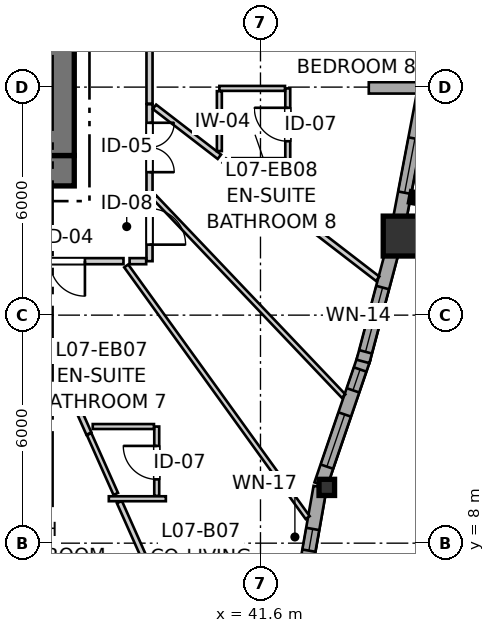
"""IFC4 building model, lengths in metres.
Left out: names, types, materials, properties, quantities, classifications, styles, units other than length and angle.
Written with IfcOpenShell. Run it as: python <this file> out.ifc"""

import sys

from ifc_helpers import new_model, si_unit, direction, frame, frame_2d, origin, origin_2d, place, context, subcontext, project, spatial, rectangle, i_section, extrude, source, transform, mapped, element, fill, save


model = new_model("IFC4")
c1 = context("Model", 3, precision=1e-05, world=origin(), true_north=direction((0.0, 1.0)))
c2 = subcontext(c1, "Body", "Model", "MODEL_VIEW")
j1 = project(units=[si_unit("LENGTHUNIT", "METRE"), si_unit("PLANEANGLEUNIT", "RADIAN")], contexts=[c1])
p1 = place(None, origin())
s1 = spatial("IfcSite", under=j1, at=p1, CompositionType="ELEMENT")
p2 = place(p1, origin())
s2 = spatial("IfcBuilding", under=s1, at=p2, CompositionType="ELEMENT")
p3 = place(p2, frame((0.0, 0.0, 27.0)))
s3 = spatial("IfcBuildingStorey", under=s2, at=p3, CompositionType="ELEMENT", Elevation=27.0)
p4 = place(p3, frame((24.0, 17.8, 0.0), z_axis=(0.0, 0.0, 1.0), x_axis=(1.0, 0.0, 0.0)))
e1 = element("IfcWall", 1, at=p4, inside=s3, PredefinedType="SHEAR", context=c2, shape_type="SweptSolid", body=[
    extrude(rectangle(XDim=12.7, YDim=0.8, at=frame_2d((6.35, 0.0))), origin(), (0.0, 0.0, 1.0), 2.935),
])
p5 = place(p3, frame((36.3, 18.2, 0.0), z_axis=(0.0, 0.0, 1.0), x_axis=(0.0, 1.0, 0.0)))
e2 = element("IfcWall", 2, at=p5, inside=s3, PredefinedType="SHEAR", context=c2, shape_type="SweptSolid", body=[
    extrude(rectangle(XDim=15.6, YDim=0.8, at=frame_2d((7.8, 0.0))), origin(), (0.0, 0.0, 1.0), 2.935),
])
p6 = place(p5, frame((4.25, 0.0, 0.0)))
e3 = element("IfcOpeningElement", 3, at=p6, cuts=e2, PredefinedType="OPENING", context=c2, shape_type="SweptSolid", body=[
    extrude(rectangle(XDim=1.1, YDim=2.15, at=frame_2d((0.55, 1.075))), frame((0.0, 0.41, 0.0), z_axis=(0.0, -1.0, 0.0), x_axis=(1.0, 0.0, 0.0)), (0.0, 0.0, 1.0), 0.82),
])
p7 = place(p5, frame((10.25, 0.0, 0.0)))
e4 = element("IfcOpeningElement", 4, at=p7, cuts=e2, PredefinedType="OPENING", context=c2, shape_type="SweptSolid", body=[
    extrude(rectangle(XDim=1.1, YDim=2.15, at=frame_2d((0.55, 1.075))), frame((0.0, 0.41, 0.0), z_axis=(0.0, -1.0, 0.0), x_axis=(1.0, 0.0, 0.0)), (0.0, 0.0, 1.0), 0.82),
])
m1 = source(origin(), c2, "Body", "SweptSolid", [
    extrude(i_section(OverallWidth=0.409, OverallDepth=0.425, WebThickness=0.03, FlangeThickness=0.048, FilletRadius=0.015, at=origin_2d()), origin(), (0.0, 0.0, 1.0), 2.935),
])
p8 = place(p3, frame((43.345, 9.468, 0.0), z_axis=(0.0, 0.0, 1.0), x_axis=(1.0, 0.0, 0.0)))
e5 = element("IfcColumn", 5, at=p8, inside=s3, PredefinedType="PILASTER", context=c2, shape_type="MappedRepresentation", body=[
    mapped(m1, transform((0.0, 0.0, 0.0), x_axis=(1.0, 0.0, 0.0), y_axis=(0.0, 1.0, 0.0), z_axis=(0.0, 0.0, 1.0), scale=1.0)),
])
m2 = source(origin(), c2, "Body", "SweptSolid", [
    extrude(rectangle(XDim=1.05, YDim=1.05, at=origin_2d()), origin(), (0.0, 0.0, 1.0), 2.935),
])
p9 = place(p3, frame((45.355, 16.081, 0.0), z_axis=(0.0, 0.0, 1.0), x_axis=(1.0, 0.0, 0.0)))
e6 = element("IfcColumn", 6, at=p9, inside=s3, PredefinedType="COLUMN", context=c2, shape_type="MappedRepresentation", body=[
    mapped(m2, transform((0.0, 0.0, 0.0), x_axis=(1.0, 0.0, 0.0), y_axis=(0.0, 1.0, 0.0), z_axis=(0.0, 0.0, 1.0), scale=1.0)),
])
p10 = place(p3, frame((42.816, 7.477, 0.0), z_axis=(0.0, 0.0, 1.0), x_axis=(0.173586593252, 0.984818610021, 0.0)))
e7 = element("IfcWall", 7, at=p10, inside=s3, PredefinedType="SOLIDWALL", context=c2, shape_type="SweptSolid", body=[
    extrude(rectangle(XDim=2.032, YDim=0.35, at=frame_2d((1.016, 0.0))), origin(), (0.0, 0.0, 1.0), 2.415),
])
p11 = place(p10, frame((0.332, 0.0, 0.82)))
e8 = element("IfcOpeningElement", 8, at=p11, cuts=e7, PredefinedType="OPENING", context=c2, shape_type="SweptSolid", body=[
    extrude(rectangle(XDim=0.58, YDim=1.35, at=frame_2d((0.29, 0.675))), frame((0.0, 0.185, 0.0), z_axis=(0.0, -1.0, 0.0), x_axis=(1.0, 0.0, 0.0)), (0.0, 0.0, 1.0), 0.37),
])
p12 = place(p3, frame((43.186, 9.543, 0.0), z_axis=(0.0, 0.0, 1.0), x_axis=(0.323620542135, 0.946186950189, 0.0)))
e9 = element("IfcWall", 9, at=p12, inside=s3, PredefinedType="SOLIDWALL", context=c2, shape_type="SweptSolid", body=[
    extrude(rectangle(XDim=3.512, YDim=0.35, at=frame_2d((1.756, 0.0))), origin(), (0.0, 0.0, 1.0), 2.415),
])
p13 = place(p12, frame((0.498, 0.0, 0.82)))
e10 = element("IfcOpeningElement", 10, at=p13, cuts=e9, PredefinedType="OPENING", context=c2, shape_type="SweptSolid", body=[
    extrude(rectangle(XDim=1.45, YDim=1.25, at=frame_2d((0.725, 0.625))), frame((0.0, 0.185, 0.0), z_axis=(0.0, -1.0, 0.0), x_axis=(1.0, 0.0, 0.0)), (0.0, 0.0, 1.0), 0.37),
])
p14 = place(p12, frame((2.619, 0.0, 0.82)))
e11 = element("IfcOpeningElement", 11, at=p14, cuts=e9, PredefinedType="OPENING", context=c2, shape_type="SweptSolid", body=[
    extrude(rectangle(XDim=0.58, YDim=1.35, at=frame_2d((0.29, 0.675))), frame((0.0, 0.185, 0.0), z_axis=(0.0, -1.0, 0.0), x_axis=(1.0, 0.0, 0.0)), (0.0, 0.0, 1.0), 0.37),
])
p15 = place(p3, frame((44.297, 12.782, 0.0), z_axis=(0.0, 0.0, 1.0), x_axis=(0.257090265476, 0.96638739406, 0.0)))
e12 = element("IfcWall", 12, at=p15, inside=s3, PredefinedType="SOLIDWALL", context=c2, shape_type="SweptSolid", body=[
    extrude(rectangle(XDim=3.159, YDim=0.35, at=frame_2d((1.58, 0.0))), origin(), (0.0, 0.0, 1.0), 2.415),
])
p16 = place(p15, frame((0.261, 0.0, 0.82)))
e13 = element("IfcOpeningElement", 13, at=p16, cuts=e12, PredefinedType="OPENING", context=c2, shape_type="SweptSolid", body=[
    extrude(rectangle(XDim=1.75, YDim=1.3, at=frame_2d((0.875, 0.65))), frame((0.0, 0.185, 0.0), z_axis=(0.0, -1.0, 0.0), x_axis=(1.0, 0.0, 0.0)), (0.0, 0.0, 1.0), 0.37),
])
p17 = place(p3, frame((45.24, 16.408, 0.0), z_axis=(0.0, 0.0, 1.0), x_axis=(0.186636709983, 0.982428999209, 0.0)))
e14 = element("IfcWall", 14, at=p17, inside=s3, PredefinedType="SOLIDWALL", context=c2, shape_type="SweptSolid", body=[
    extrude(rectangle(XDim=3.446, YDim=0.35, at=frame_2d((1.723, 0.0))), origin(), (0.0, 0.0, 1.0), 2.415),
])
p18 = place(p17, frame((0.828, 0.0, 0.82)))
e15 = element("IfcOpeningElement", 15, at=p18, cuts=e14, PredefinedType="OPENING", context=c2, shape_type="SweptSolid", body=[
    extrude(rectangle(XDim=1.45, YDim=1.25, at=frame_2d((0.725, 0.625))), frame((0.0, 0.185, 0.0), z_axis=(0.0, -1.0, 0.0), x_axis=(1.0, 0.0, 0.0)), (0.0, 0.0, 1.0), 0.37),
])
p19 = place(p3, frame((44.45, 19.98, 0.0), z_axis=(0.0, 0.0, 1.0), x_axis=(1.0, 0.0, 0.0)))
e16 = element("IfcWall", 16, at=p19, inside=s3, PredefinedType="SOLIDWALL", context=c2, shape_type="SweptSolid", body=[
    extrude(rectangle(XDim=20.685, YDim=0.3, at=frame_2d((10.342, 0.0))), origin(), (0.0, 0.0, 1.0), 2.115),
])
p20 = place(p3, frame((38.68, 23.699, 0.0), z_axis=(0.0, 0.0, 1.0), x_axis=(0.0, -1.0, 0.0)))
e17 = element("IfcWall", 17, at=p20, inside=s3, PredefinedType="PARTITIONING", context=c2, shape_type="SweptSolid", body=[
    extrude(rectangle(XDim=4.135, YDim=0.16, at=frame_2d((2.067, 0.0))), origin(), (0.0, 0.0, 1.0), 2.935),
])
p21 = place(p20, frame((1.583, 0.0, 0.0)))
e18 = element("IfcOpeningElement", 18, at=p21, cuts=e17, PredefinedType="OPENING", context=c2, shape_type="SweptSolid", body=[
    extrude(rectangle(XDim=0.92, YDim=2.1, at=frame_2d((0.46, 1.05))), frame((0.0, 0.09, 0.0), z_axis=(0.0, -1.0, 0.0), x_axis=(1.0, 0.0, 0.0)), (0.0, 0.0, 1.0), 0.18),
])
p22 = place(p3, frame((37.995, 15.42, 0.0), z_axis=(0.0, 0.0, 1.0), x_axis=(-1.0, 0.0, 0.0)))
e19 = element("IfcWall", 19, at=p22, inside=s3, PredefinedType="PARTITIONING", context=c2, shape_type="SweptSolid", body=[
    extrude(rectangle(XDim=2.9, YDim=0.16, at=frame_2d((1.45, 0.0))), origin(), (0.0, 0.0, 1.0), 2.935),
])
p23 = place(p22, frame((1.014, 0.0, 0.0)))
e20 = element("IfcOpeningElement", 20, at=p23, cuts=e19, PredefinedType="OPENING", context=c2, shape_type="SweptSolid", body=[
    extrude(rectangle(XDim=0.92, YDim=2.1, at=frame_2d((0.46, 1.05))), frame((0.0, 0.09, 0.0), z_axis=(0.0, -1.0, 0.0), x_axis=(1.0, 0.0, 0.0)), (0.0, 0.0, 1.0), 0.18),
])
p24 = place(p3, frame((38.68, 19.549, 0.0), z_axis=(0.0, 0.0, 1.0), x_axis=(0.0, -1.0, 0.0)))
e21 = element("IfcWall", 21, at=p24, inside=s3, PredefinedType="PARTITIONING", context=c2, shape_type="SweptSolid", body=[
    extrude(rectangle(XDim=2.331, YDim=0.16, at=frame_2d((1.166, 0.0))), origin(), (0.0, 0.0, 1.0), 2.935),
])
p25 = place(p24, frame((0.488, 0.0, 0.0)))
e22 = element("IfcOpeningElement", 22, at=p25, cuts=e21, PredefinedType="OPENING", context=c2, shape_type="SweptSolid", body=[
    extrude(rectangle(XDim=1.3, YDim=2.1, at=frame_2d((0.65, 1.05))), frame((0.0, 0.09, 0.0), z_axis=(0.0, -1.0, 0.0), x_axis=(1.0, 0.0, 0.0)), (0.0, 0.0, 1.0), 0.18),
])
p26 = place(p3, frame((42.318, 18.066, 0.0), z_axis=(0.0, 0.0, 1.0), x_axis=(0.0, 1.0, 0.0)))
e23 = element("IfcWall", 23, at=p26, inside=s3, PredefinedType="PARTITIONING", context=c2, shape_type="SweptSolid", body=[
    extrude(rectangle(XDim=1.9, YDim=0.13, at=frame_2d((0.95, 0.0))), origin(), (0.0, 0.0, 1.0), 2.935),
])
p27 = place(p26, frame((0.51, 0.0, 0.0)))
e24 = element("IfcOpeningElement", 24, at=p27, cuts=e23, PredefinedType="OPENING", context=c2, shape_type="SweptSolid", body=[
    extrude(rectangle(XDim=0.88, YDim=2.05, at=frame_2d((0.44, 1.025))), frame((0.0, 0.075, 0.0), z_axis=(0.0, -1.0, 0.0), x_axis=(1.0, 0.0, 0.0)), (0.0, 0.0, 1.0), 0.15),
])
p28 = place(p3, frame((38.87, 9.242, 0.0), z_axis=(0.0, 0.0, 1.0), x_axis=(0.0, 1.0, 0.0)))
e25 = element("IfcWall", 25, at=p28, inside=s3, PredefinedType="PARTITIONING", context=c2, shape_type="SweptSolid", body=[
    extrude(rectangle(XDim=1.827, YDim=0.13, at=frame_2d((0.914, 0.0))), origin(), (0.0, 0.0, 1.0), 2.935),
])
p29 = place(p28, frame((0.437, 0.0, 0.0)))
e26 = element("IfcOpeningElement", 26, at=p29, cuts=e25, PredefinedType="OPENING", context=c2, shape_type="SweptSolid", body=[
    extrude(rectangle(XDim=0.88, YDim=2.05, at=frame_2d((0.44, 1.025))), frame((0.0, 0.075, 0.0), z_axis=(0.0, -1.0, 0.0), x_axis=(1.0, 0.0, 0.0)), (0.0, 0.0, 1.0), 0.15),
])
p30 = place(p3, frame((38.68, 17.203, 0.0), z_axis=(0.0, 0.0, 1.0), x_axis=(0.0, -1.0, 0.0)))
e27 = element("IfcWall", 27, at=p30, inside=s3, PredefinedType="PARTITIONING", context=c2, shape_type="SweptSolid", body=[
    extrude(rectangle(XDim=1.783, YDim=0.16, at=frame_2d((0.892, 0.0))), origin(), (0.0, 0.0, 1.0), 2.935),
])
p31 = place(p30, frame((0.398, 0.0, 0.0)))
e28 = element("IfcOpeningElement", 28, at=p31, cuts=e27, PredefinedType="OPENING", context=c2, shape_type="SweptSolid", body=[
    extrude(rectangle(XDim=0.95, YDim=2.1, at=frame_2d((0.475, 1.05))), frame((0.0, 0.09, 0.0), z_axis=(0.0, -1.0, 0.0), x_axis=(1.0, 0.0, 0.0)), (0.0, 0.0, 1.0), 0.18),
])
p32 = place(p3, frame((38.067, 15.295, 0.0), z_axis=(0.0, 0.0, 1.0), x_axis=(0.584777320582, -0.811193864211, 0.0)))
e29 = element("IfcWall", 29, at=p32, inside=s3, PredefinedType="PARTITIONING", context=c2, shape_type="SweptSolid", body=[
    extrude(rectangle(XDim=8.164, YDim=0.13, at=frame_2d((4.082, 0.0))), origin(), (0.0, 0.0, 1.0), 2.935),
])
p33 = place(p3, frame((38.812, 17.101, 0.0), z_axis=(0.0, 0.0, 1.0), x_axis=(0.689140556814, -0.724627692649, 0.0)))
e30 = element("IfcWall", 30, at=p33, inside=s3, PredefinedType="PARTITIONING", context=c2, shape_type="SweptSolid", body=[
    extrude(rectangle(XDim=7.217, YDim=0.13, at=frame_2d((3.608, 0.0))), origin(), (0.0, 0.0, 1.0), 2.935),
])
p34 = place(p3, frame((40.649, 18.066, 0.0), z_axis=(0.0, 0.0, 1.0), x_axis=(0.792155051101, -0.610319895641, 0.0)))
e31 = element("IfcWall", 31, at=p34, inside=s3, PredefinedType="PARTITIONING", context=c2, shape_type="SweptSolid", body=[
    extrude(rectangle(XDim=5.093, YDim=0.145, at=frame_2d((2.546, 0.0))), origin(), (0.0, 0.0, 1.0), 2.935),
])
p35 = place(p3, frame((37.887, 9.082, 0.0), z_axis=(0.0, 0.0, 1.0), x_axis=(0.406941066305, -0.913454415149, 0.0)))
e32 = element("IfcWall", 32, at=p35, inside=s3, PredefinedType="PARTITIONING", context=c2, shape_type="SweptSolid", body=[
    extrude(rectangle(XDim=4.882, YDim=0.145, at=frame_2d((2.441, 0.0))), origin(), (0.0, 0.0, 1.0), 2.935),
])
p36 = place(p3, frame((35.116, 15.303, 0.0), z_axis=(0.0, 0.0, 1.0), x_axis=(0.406910733823, -0.913467927571, 0.0)))
e33 = element("IfcWall", 33, at=p36, inside=s3, PredefinedType="PARTITIONING", context=c2, shape_type="SweptSolid", body=[
    extrude(rectangle(XDim=4.839, YDim=0.145, at=frame_2d((2.419, 0.0))), origin(), (0.0, 0.0, 1.0), 2.935),
])
p37 = place(p3, frame((38.811, 19.482, 0.0), z_axis=(0.0, 0.0, 1.0), x_axis=(0.792185877025, -0.61027988353, 0.0)))
e34 = element("IfcWall", 34, at=p37, inside=s3, PredefinedType="PARTITIONING", context=c2, shape_type="SweptSolid", body=[
    extrude(rectangle(XDim=2.156, YDim=0.145, at=frame_2d((1.078, 0.0))), origin(), (0.0, 0.0, 1.0), 2.935),
])
p38 = place(p3, frame((37.091, 10.869, 0.0), z_axis=(0.0, 0.0, 1.0), x_axis=(0.406835672622, -0.913501360416, 0.0)))
e35 = element("IfcWall", 35, at=p38, inside=s3, PredefinedType="PARTITIONING", context=c2, shape_type="SweptSolid", body=[
    extrude(rectangle(XDim=1.722, YDim=0.13, at=frame_2d((0.861, 0.0))), origin(), (0.0, 0.0, 1.0), 2.935),
])
p39 = place(p3, frame((37.186, 11.069, 0.0), z_axis=(0.0, 0.0, 1.0), x_axis=(1.0, 0.0, 0.0)))
e36 = element("IfcWall", 36, at=p39, inside=s3, PredefinedType="PARTITIONING", context=c2, shape_type="SweptSolid", body=[
    extrude(rectangle(XDim=1.611, YDim=0.13, at=frame_2d((0.805, 0.0))), origin(), (0.0, 0.0, 1.0), 2.935),
])
p40 = place(p3, frame((40.518, 19.966, 0.0), z_axis=(0.0, 0.0, 1.0), x_axis=(1.0, 0.0, 0.0)))
e37 = element("IfcWall", 37, at=p40, inside=s3, PredefinedType="PARTITIONING", context=c2, shape_type="SweptSolid", body=[
    extrude(rectangle(XDim=1.727, YDim=0.13, at=frame_2d((0.864, 0.0))), origin(), (0.0, 0.0, 1.0), 2.103),
])
p41 = place(p3, frame((40.518, 18.317, 0.0), z_axis=(0.0, 0.0, 1.0), x_axis=(0.0, 1.0, 0.0)))
e38 = element("IfcWall", 38, at=p41, inside=s3, PredefinedType="PARTITIONING", context=c2, shape_type="SweptSolid", body=[
    extrude(rectangle(XDim=1.576, YDim=0.13, at=frame_2d((0.788, 0.0))), origin(), (0.0, 0.0, 1.0), 2.935),
])
p42 = place(p3, frame((40.86, 18.066, 0.0), z_axis=(0.0, 0.0, 1.0), x_axis=(1.0, 0.0, 0.0)))
e39 = element("IfcWall", 39, at=p42, inside=s3, PredefinedType="PARTITIONING", context=c2, shape_type="SweptSolid", body=[
    extrude(rectangle(XDim=1.385, YDim=0.13, at=frame_2d((0.692, 0.0))), origin(), (0.0, 0.0, 1.0), 2.935),
])
p43 = place(p3, frame((37.609, 9.169, 0.0), z_axis=(0.0, 0.0, 1.0), x_axis=(1.0, 0.0, 0.0)))
e40 = element("IfcWall", 40, at=p43, inside=s3, PredefinedType="PARTITIONING", context=c2, shape_type="SweptSolid", body=[
    extrude(rectangle(XDim=1.501, YDim=0.13, at=frame_2d((0.75, 0.0))), origin(), (0.0, 0.0, 1.0), 2.935),
])
p44 = place(p3, frame((38.156, 15.42, 0.0), z_axis=(0.0, 0.0, 1.0), x_axis=(1.0, 0.0, 0.0)))
e41 = element("IfcWall", 41, at=p44, inside=s3, PredefinedType="PARTITIONING", context=c2, shape_type="SweptSolid", body=[
    extrude(rectangle(XDim=0.436, YDim=0.16, at=frame_2d((0.218, 0.0))), origin(), (0.0, 0.0, 1.0), 2.935),
])
m3 = source(origin(), c2, "Body", "SweptSolid", [
    extrude(rectangle(XDim=0.58, YDim=1.35, at=frame_2d((0.29, 0.675))), frame((0.0, 0.03, 0.0), z_axis=(0.0, -1.0, 0.0), x_axis=(1.0, 0.0, 0.0)), (0.0, 0.0, 1.0), 0.06),
])
p45 = place(p11, origin())
e42 = element("IfcWindow", 42, at=p45, inside=s3, PartitioningType="SINGLE_PANEL", PredefinedType="WINDOW", context=c2, shape_type="MappedRepresentation", body=[
    mapped(m3, transform((0.0, 0.0, 0.0), x_axis=(1.0, 0.0, 0.0), y_axis=(0.0, 1.0, 0.0), z_axis=(0.0, 0.0, 1.0), scale=1.0)),
])
fill(e8, e42)
m4 = source(origin(), c2, "Body", "SweptSolid", [
    extrude(rectangle(XDim=1.45, YDim=1.25, at=frame_2d((0.725, 0.625))), frame((0.0, 0.03, 0.0), z_axis=(0.0, -1.0, 0.0), x_axis=(1.0, 0.0, 0.0)), (0.0, 0.0, 1.0), 0.06),
])
p46 = place(p13, origin())
e43 = element("IfcWindow", 43, at=p46, inside=s3, PartitioningType="SINGLE_PANEL", PredefinedType="WINDOW", context=c2, shape_type="MappedRepresentation", body=[
    mapped(m4, transform((0.0, 0.0, 0.0), x_axis=(1.0, 0.0, 0.0), y_axis=(0.0, 1.0, 0.0), z_axis=(0.0, 0.0, 1.0), scale=1.0)),
])
fill(e10, e43)
p47 = place(p14, origin())
e44 = element("IfcWindow", 44, at=p47, inside=s3, PartitioningType="SINGLE_PANEL", PredefinedType="WINDOW", context=c2, shape_type="MappedRepresentation", body=[
    mapped(m3, transform((0.0, 0.0, 0.0), x_axis=(1.0, 0.0, 0.0), y_axis=(0.0, 1.0, 0.0), z_axis=(0.0, 0.0, 1.0), scale=1.0)),
])
fill(e11, e44)
m5 = source(origin(), c2, "Body", "SweptSolid", [
    extrude(rectangle(XDim=1.75, YDim=1.3, at=frame_2d((0.875, 0.65))), frame((0.0, 0.03, 0.0), z_axis=(0.0, -1.0, 0.0), x_axis=(1.0, 0.0, 0.0)), (0.0, 0.0, 1.0), 0.06),
])
p48 = place(p16, origin())
e45 = element("IfcWindow", 45, at=p48, inside=s3, PartitioningType="SINGLE_PANEL", PredefinedType="WINDOW", context=c2, shape_type="MappedRepresentation", body=[
    mapped(m5, transform((0.0, 0.0, 0.0), x_axis=(1.0, 0.0, 0.0), y_axis=(0.0, 1.0, 0.0), z_axis=(0.0, 0.0, 1.0), scale=1.0)),
])
fill(e13, e45)
p49 = place(p18, origin())
e46 = element("IfcWindow", 46, at=p49, inside=s3, PartitioningType="SINGLE_PANEL", PredefinedType="WINDOW", context=c2, shape_type="MappedRepresentation", body=[
    mapped(m4, transform((0.0, 0.0, 0.0), x_axis=(1.0, 0.0, 0.0), y_axis=(0.0, 1.0, 0.0), z_axis=(0.0, 0.0, 1.0), scale=1.0)),
])
fill(e15, e46)
m6 = source(origin(), c2, "Body", "SweptSolid", [
    extrude(rectangle(XDim=0.92, YDim=2.1, at=frame_2d((0.46, 1.05))), frame((0.0, 0.025, 0.0), z_axis=(0.0, -1.0, 0.0), x_axis=(1.0, 0.0, 0.0)), (0.0, 0.0, 1.0), 0.05),
])
p50 = place(p23, origin())
e47 = element("IfcDoor", 47, at=p50, inside=s3, OperationType="SINGLE_SWING_LEFT", PredefinedType="DOOR", context=c2, shape_type="MappedRepresentation", body=[
    mapped(m6, transform((0.0, 0.0, 0.0), x_axis=(1.0, 0.0, 0.0), y_axis=(0.0, 1.0, 0.0), z_axis=(0.0, 0.0, 1.0), scale=1.0)),
])
fill(e20, e47)
m7 = source(origin(), c2, "Body", "SweptSolid", [
    extrude(rectangle(XDim=1.3, YDim=2.1, at=frame_2d((0.65, 1.05))), frame((0.0, 0.025, 0.0), z_axis=(0.0, -1.0, 0.0), x_axis=(1.0, 0.0, 0.0)), (0.0, 0.0, 1.0), 0.05),
])
p51 = place(p25, origin())
e48 = element("IfcDoor", 48, at=p51, inside=s3, OperationType="DOUBLE_DOOR_SINGLE_SWING", PredefinedType="DOOR", context=c2, shape_type="MappedRepresentation", body=[
    mapped(m7, transform((0.0, 0.0, 0.0), x_axis=(1.0, 0.0, 0.0), y_axis=(0.0, 1.0, 0.0), z_axis=(0.0, 0.0, 1.0), scale=1.0)),
])
fill(e22, e48)
m8 = source(origin(), c2, "Body", "SweptSolid", [
    extrude(rectangle(XDim=0.88, YDim=2.05, at=frame_2d((0.44, 1.025))), frame((0.0, 0.025, 0.0), z_axis=(0.0, -1.0, 0.0), x_axis=(1.0, 0.0, 0.0)), (0.0, 0.0, 1.0), 0.05),
])
p52 = place(p27, origin())
e49 = element("IfcDoor", 49, at=p52, inside=s3, OperationType="SINGLE_SWING_RIGHT", PredefinedType="DOOR", context=c2, shape_type="MappedRepresentation", body=[
    mapped(m8, transform((0.0, 0.0, 0.0), x_axis=(1.0, 0.0, 0.0), y_axis=(0.0, 1.0, 0.0), z_axis=(0.0, 0.0, 1.0), scale=1.0)),
])
fill(e24, e49)
p53 = place(p29, origin())
e50 = element("IfcDoor", 50, at=p53, inside=s3, OperationType="SINGLE_SWING_RIGHT", PredefinedType="DOOR", context=c2, shape_type="MappedRepresentation", body=[
    mapped(m8, transform((0.0, 0.0, 0.0), x_axis=(1.0, 0.0, 0.0), y_axis=(0.0, 1.0, 0.0), z_axis=(0.0, 0.0, 1.0), scale=1.0)),
])
fill(e26, e50)
m9 = source(origin(), c2, "Body", "SweptSolid", [
    extrude(rectangle(XDim=0.95, YDim=2.1, at=frame_2d((0.475, 1.05))), frame((0.0, 0.025, 0.0), z_axis=(0.0, -1.0, 0.0), x_axis=(1.0, 0.0, 0.0)), (0.0, 0.0, 1.0), 0.05),
])
p54 = place(p31, origin())
e51 = element("IfcDoor", 51, at=p54, inside=s3, OperationType="SINGLE_SWING_RIGHT", PredefinedType="DOOR", context=c2, shape_type="MappedRepresentation", body=[
    mapped(m9, transform((0.0, 0.0, 0.0), x_axis=(1.0, 0.0, 0.0), y_axis=(0.0, 1.0, 0.0), z_axis=(0.0, 0.0, 1.0), scale=1.0)),
])
fill(e28, e51)
save(model, sys.argv[1])
